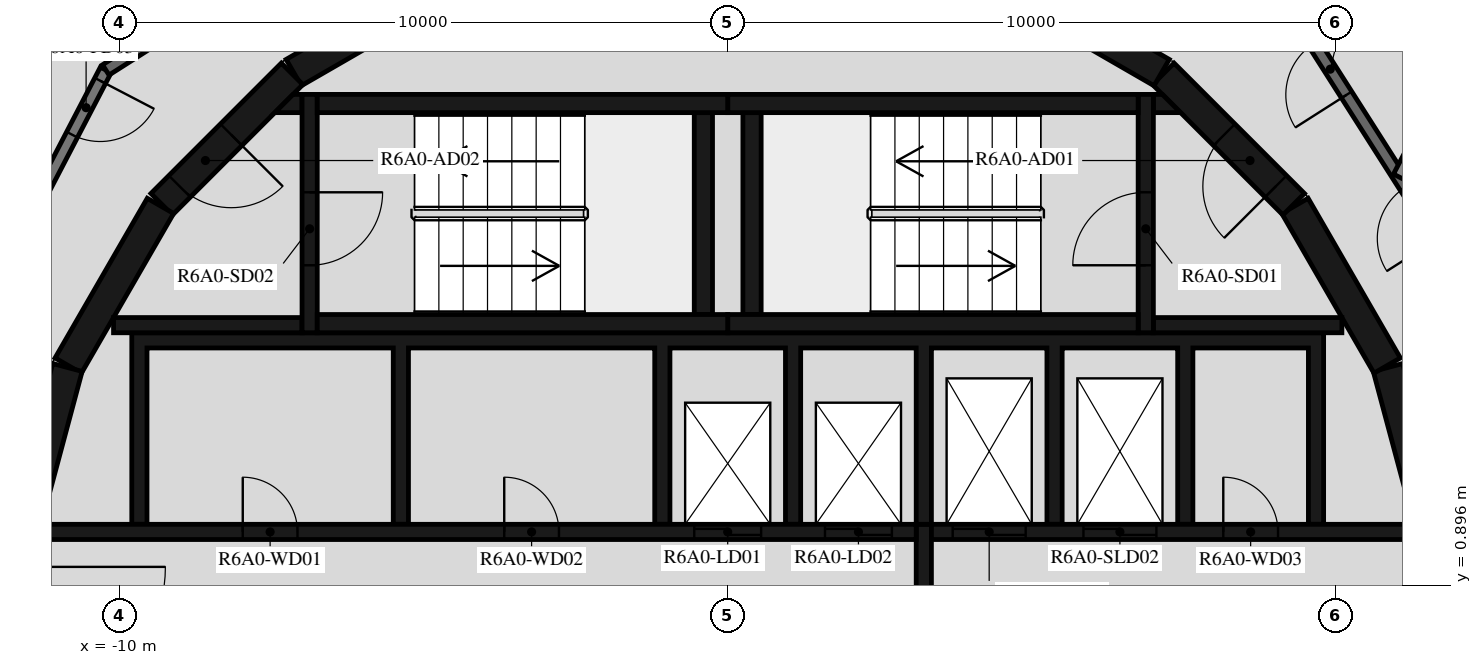
"""IFC4 building model, lengths in metres.
Left out: names, types, materials, properties, quantities, classifications, styles, units other than length and angle.
Written with IfcOpenShell. Run it as: python <this file> out.ifc"""

import sys

from ifc_helpers import new_model, si_unit, direction, frame, frame_2d, origin, place, context, subcontext, project, spatial, polyline, rectangle, outline, extrude, element, fill, save


model = new_model("IFC4")
c1 = context("Model", 3, precision=1e-05, world=origin(), true_north=direction((0.0, 1.0)))
c2 = subcontext(c1, "Body", "Model", "MODEL_VIEW")
j1 = project(units=[si_unit("LENGTHUNIT", "METRE"), si_unit("PLANEANGLEUNIT", "RADIAN")], contexts=[c1])
p1 = place(None, origin())
s1 = spatial("IfcSite", under=j1, at=p1, CompositionType="ELEMENT")
p2 = place(p1, origin())
s2 = spatial("IfcBuilding", under=s1, at=p2, CompositionType="ELEMENT")
p3 = place(p2, frame((0.0, 0.0, 226.7)))
s3 = spatial("IfcBuildingStorey", under=s2, at=p3, CompositionType="ELEMENT", Elevation=226.7)
for number, where, z_axis, x_axis in (
    (1, (11.643, 1.55, 0.0), (0.0, 0.0, 1.0), (-0.259, 0.966, 0.0)),
    (2, (10.845, 4.51, 0.0), (0.0, 0.0, 1.0), (-0.5, 0.866, 0.0)),
):
    element("IfcWall", number, at=place(p3, frame(where, z_axis=z_axis, x_axis=x_axis)), inside=s3, PredefinedType="SHEAR", context=c2, shape_type="SweptSolid", body=[
        extrude(rectangle(XDim=3.033, YDim=0.5, at=frame_2d((1.516, 0.0))), origin(), (0.0, 0.0, 1.0), 3.12),
    ])
p4 = place(p3, frame((9.308, 7.164, 0.0), z_axis=(0.0, 0.0, 1.0), x_axis=(-0.707106781187, 0.707106781187, 0.0)))
e3 = element("IfcWall", 3, at=p4, inside=s3, PredefinedType="SHEAR", context=c2, shape_type="SweptSolid", body=[
    extrude(rectangle(XDim=3.032, YDim=0.5, at=frame_2d((1.516, 0.0))), origin(), (0.0, 0.0, 1.0), 3.12),
])
p5 = place(p4, frame((0.416, 0.0, 0.0)))
e4 = element("IfcOpeningElement", 4, at=p5, cuts=e3, PredefinedType="OPENING", context=c2, shape_type="SweptSolid", body=[
    extrude(rectangle(XDim=1.2, YDim=2.1, at=frame_2d((0.6, 1.05))), frame((0.0, 0.26, 0.0), z_axis=(0.0, -1.0, 0.0), x_axis=(1.0, 0.0, 0.0)), (0.0, 0.0, 1.0), 0.52),
])
for number, where, z_axis, x_axis in (
    (5, (7.137, 9.329, 0.0), (0.0, 0.0, 1.0), (-0.866, 0.5, 0.0)),
    (6, (-4.51, 10.845, 0.0), (0.0, 0.0, 1.0), (-0.866, -0.5, 0.0)),
):
    element("IfcWall", number, at=place(p3, frame(where, z_axis=z_axis, x_axis=x_axis)), inside=s3, PredefinedType="SHEAR", context=c2, shape_type="SweptSolid", body=[
        extrude(rectangle(XDim=3.033, YDim=0.5, at=frame_2d((1.516, 0.0))), origin(), (0.0, 0.0, 1.0), 3.12),
    ])
p6 = place(p3, frame((-7.164, 9.308, 0.0), z_axis=(0.0, 0.0, 1.0), x_axis=(-0.707106781187, -0.707106781187, 0.0)))
e7 = element("IfcWall", 7, at=p6, inside=s3, PredefinedType="SHEAR", context=c2, shape_type="SweptSolid", body=[
    extrude(rectangle(XDim=3.032, YDim=0.5, at=frame_2d((1.516, 0.0))), origin(), (0.0, 0.0, 1.0), 3.12),
])
p7 = place(p6, frame((1.416, 0.0, 0.0)))
e8 = element("IfcOpeningElement", 8, at=p7, cuts=e7, PredefinedType="OPENING", context=c2, shape_type="SweptSolid", body=[
    extrude(rectangle(XDim=1.2, YDim=2.1, at=frame_2d((0.6, 1.05))), frame((0.0, 0.26, 0.0), z_axis=(0.0, -1.0, 0.0), x_axis=(1.0, 0.0, 0.0)), (0.0, 0.0, 1.0), 0.52),
])
for number, where, z_axis, x_axis in (
    (9, (-9.329, 7.137, 0.0), (0.0, 0.0, 1.0), (-0.5, -0.866, 0.0)),
    (10, (-10.858, 4.479, 0.0), (0.0, 0.0, 1.0), (-0.259, -0.966, 0.0)),
):
    element("IfcWall", number, at=place(p3, frame(where, z_axis=z_axis, x_axis=x_axis)), inside=s3, PredefinedType="SHEAR", context=c2, shape_type="SweptSolid", body=[
        extrude(rectangle(XDim=3.033, YDim=0.5, at=frame_2d((1.516, 0.0))), origin(), (0.0, 0.0, 1.0), 3.12),
    ])
for number, where, z_axis, x_axis in (
    (11, (0.0, 5.2, 0.0), (0.0, 0.0, 1.0), (1.0, 0.0, 0.0)),
    (12, (0.0, 8.82, 0.0), (0.0, 0.0, 1.0), (1.0, 0.0, 0.0)),
):
    element("IfcWall", number, at=place(p3, frame(where, z_axis=z_axis, x_axis=x_axis)), inside=s3, PredefinedType="SHEAR", context=c2, shape_type="SweptSolid", body=[
        extrude(rectangle(XDim=6.75, YDim=0.3, at=frame_2d((3.375, 0.0))), origin(), (0.0, 0.0, 1.0), 3.12),
    ])
p8 = place(p3, frame((0.4, 5.35, 0.0), z_axis=(0.0, 0.0, 1.0), x_axis=(0.0, 1.0, 0.0)))
e13 = element("IfcWall", 13, at=p8, inside=s3, PredefinedType="SHEAR", context=c2, shape_type="SweptSolid", body=[
    extrude(rectangle(XDim=3.32, YDim=0.3, at=frame_2d((1.66, 0.0))), origin(), (0.0, 0.0, 1.0), 3.12),
])
p9 = place(p3, frame((6.875, 5.05, 0.0), z_axis=(0.0, 0.0, 1.0), x_axis=(0.0, 1.0, 0.0)))
e14 = element("IfcWall", 14, at=p9, inside=s3, PredefinedType="SHEAR", context=c2, shape_type="SweptSolid", body=[
    extrude(rectangle(XDim=3.92, YDim=0.25, at=frame_2d((1.96, 0.0))), origin(), (0.0, 0.0, 1.0), 3.12),
])
p10 = place(p9, frame((1.11, 0.0, 0.0)))
e15 = element("IfcOpeningElement", 15, at=p10, cuts=e14, PredefinedType="OPENING", context=c2, shape_type="SweptSolid", body=[
    extrude(rectangle(XDim=1.2, YDim=2.1, at=frame_2d((0.6, 1.05))), frame((0.0, 0.135, 0.0), z_axis=(0.0, -1.0, 0.0), x_axis=(1.0, 0.0, 0.0)), (0.0, 0.0, 1.0), 0.27),
])
p11 = place(p3, frame((7.0, 5.175, 0.0), z_axis=(0.0, 0.0, 1.0), x_axis=(1.0, 0.0, 0.0)))
e16 = element("IfcWall", 16, at=p11, inside=s3, PredefinedType="SHEAR", context=c2, shape_type="SweptSolid", body=[
    extrude(rectangle(XDim=3.1, YDim=0.25, at=frame_2d((1.55, 0.0))), origin(), (0.0, 0.0, 1.0), 3.12),
])
p12 = place(p3, origin())
e17 = element("IfcWall", 17, at=p12, inside=s3, PredefinedType="SHEAR", context=c2, shape_type="SweptSolid", body=[
    extrude(outline(polyline([(7.448, 8.67), (7.0, 8.67), (7.0, 8.97), (7.148, 8.97), (7.448, 8.67)])), origin(), (0.0, 0.0, 1.0), 3.12),
])
for number, where, z_axis, x_axis in (
    (18, (-6.75, 5.2, 0.0), (0.0, 0.0, 1.0), (1.0, 0.0, 0.0)),
    (19, (-6.75, 8.82, 0.0), (0.0, 0.0, 1.0), (1.0, 0.0, 0.0)),
):
    element("IfcWall", number, at=place(p3, frame(where, z_axis=z_axis, x_axis=x_axis)), inside=s3, PredefinedType="SHEAR", context=c2, shape_type="SweptSolid", body=[
        extrude(rectangle(XDim=6.75, YDim=0.3, at=frame_2d((3.375, 0.0))), origin(), (0.0, 0.0, 1.0), 3.12),
    ])
p13 = place(p3, frame((-0.4, 5.35, 0.0), z_axis=(0.0, 0.0, 1.0), x_axis=(0.0, 1.0, 0.0)))
e20 = element("IfcWall", 20, at=p13, inside=s3, PredefinedType="SHEAR", context=c2, shape_type="SweptSolid", body=[
    extrude(rectangle(XDim=3.32, YDim=0.3, at=frame_2d((1.66, 0.0))), origin(), (0.0, 0.0, 1.0), 3.12),
])
p14 = place(p3, frame((-6.875, 8.97, 0.0), z_axis=(0.0, 0.0, 1.0), x_axis=(0.0, -1.0, 0.0)))
e21 = element("IfcWall", 21, at=p14, inside=s3, PredefinedType="SHEAR", context=c2, shape_type="SweptSolid", body=[
    extrude(rectangle(XDim=3.92, YDim=0.25, at=frame_2d((1.96, 0.0))), origin(), (0.0, 0.0, 1.0), 3.12),
])
p15 = place(p14, frame((1.61, 0.0, 0.0)))
e22 = element("IfcOpeningElement", 22, at=p15, cuts=e21, PredefinedType="OPENING", context=c2, shape_type="SweptSolid", body=[
    extrude(rectangle(XDim=1.2, YDim=2.1, at=frame_2d((0.6, 1.05))), frame((0.0, 0.135, 0.0), z_axis=(0.0, -1.0, 0.0), x_axis=(1.0, 0.0, 0.0)), (0.0, 0.0, 1.0), 0.27),
])
p16 = place(p3, frame((-7.0, 5.175, 0.0), z_axis=(0.0, 0.0, 1.0), x_axis=(-1.0, 0.0, 0.0)))
e23 = element("IfcWall", 23, at=p16, inside=s3, PredefinedType="SHEAR", context=c2, shape_type="SweptSolid", body=[
    extrude(rectangle(XDim=3.1, YDim=0.25, at=frame_2d((1.55, 0.0))), origin(), (0.0, 0.0, 1.0), 3.12),
])
p17 = place(p3, origin())
e24 = element("IfcWall", 24, at=p17, inside=s3, PredefinedType="SHEAR", context=c2, shape_type="SweptSolid", body=[
    extrude(outline(polyline([(-7.148, 8.97), (-7.0, 8.97), (-7.0, 8.67), (-7.448, 8.67), (-7.148, 8.97)])), origin(), (0.0, 0.0, 1.0), 3.12),
])
p18 = place(p3, origin())
e25 = element("IfcWall", 25, at=p18, inside=s3, PredefinedType="SHEAR", context=c2, shape_type="SweptSolid", body=[
    extrude(outline(polyline([(-9.55, 4.8), (-5.5, 4.8), (-5.5, 1.9), (-5.25, 1.9), (-5.25, 4.8), (-1.2, 4.8), (-1.2, 1.9), (-0.95, 1.9), (-0.95, 4.8), (0.95, 4.8), (0.95, 1.9), (1.2, 1.9), (1.2, 4.8), (3.1, 4.8), (3.1, 1.9), (3.35, 1.9), (3.35, 4.8), (5.25, 4.8), (5.25, 1.9), (5.5, 1.9), (5.5, 4.8), (7.4, 4.8), (7.4, 1.9), (7.65, 1.9), (7.65, 4.8), (9.55, 4.8), (9.55, 1.9), (9.8, 1.9), (9.8, 4.8), (9.8, 5.05), (-9.8, 5.05), (-9.8, 4.8), (-9.8, 1.9), (-9.55, 1.9), (-9.55, 4.8)])), origin(), (0.0, 0.0, 1.0), 3.12),
])
p19 = place(p3, frame((-11.28, 1.775, 0.0), z_axis=(0.0, 0.0, 1.0), x_axis=(1.0, 0.0, 0.0)))
e26 = element("IfcWall", 26, at=p19, inside=s3, PredefinedType="SHEAR", context=c2, shape_type="SweptSolid", body=[
    extrude(rectangle(XDim=14.38, YDim=0.25, at=frame_2d((7.19, 0.0))), origin(), (0.0, 0.0, 1.0), 3.12),
])
p20 = place(p19, frame((10.73, 0.0, 0.0)))
e27 = element("IfcOpeningElement", 27, at=p20, cuts=e26, PredefinedType="OPENING", context=c2, shape_type="SweptSolid", body=[
    extrude(rectangle(XDim=1.1, YDim=2.1, at=frame_2d((0.55, 1.05))), frame((0.0, 0.135, 0.0), z_axis=(0.0, -1.0, 0.0), x_axis=(1.0, 0.0, 0.0)), (0.0, 0.0, 1.0), 0.27),
])
p21 = place(p19, frame((12.88, 0.0, 0.0)))
e28 = element("IfcOpeningElement", 28, at=p21, cuts=e26, PredefinedType="OPENING", context=c2, shape_type="SweptSolid", body=[
    extrude(rectangle(XDim=1.1, YDim=2.1, at=frame_2d((0.55, 1.05))), frame((0.0, 0.135, 0.0), z_axis=(0.0, -1.0, 0.0), x_axis=(1.0, 0.0, 0.0)), (0.0, 0.0, 1.0), 0.27),
])
p22 = place(p19, frame((3.305, 0.0, 0.0)))
e29 = element("IfcOpeningElement", 29, at=p22, cuts=e26, PredefinedType="OPENING", context=c2, shape_type="SweptSolid", body=[
    extrude(rectangle(XDim=0.9, YDim=2.1, at=frame_2d((0.45, 1.05))), frame((0.0, 0.135, 0.0), z_axis=(0.0, -1.0, 0.0), x_axis=(1.0, 0.0, 0.0)), (0.0, 0.0, 1.0), 0.27),
])
p23 = place(p19, frame((7.605, 0.0, 0.0)))
e30 = element("IfcOpeningElement", 30, at=p23, cuts=e26, PredefinedType="OPENING", context=c2, shape_type="SweptSolid", body=[
    extrude(rectangle(XDim=0.9, YDim=2.1, at=frame_2d((0.45, 1.05))), frame((0.0, 0.135, 0.0), z_axis=(0.0, -1.0, 0.0), x_axis=(1.0, 0.0, 0.0)), (0.0, 0.0, 1.0), 0.27),
])
p24 = place(p3, frame((3.35, 1.775, 0.0), z_axis=(0.0, 0.0, 1.0), x_axis=(1.0, 0.0, 0.0)))
e31 = element("IfcWall", 31, at=p24, inside=s3, PredefinedType="SHEAR", context=c2, shape_type="SweptSolid", body=[
    extrude(rectangle(XDim=7.93, YDim=0.25, at=frame_2d((3.965, 0.0))), origin(), (0.0, 0.0, 1.0), 3.12),
])
p25 = place(p24, frame((0.35, 0.0, 0.0)))
e32 = element("IfcOpeningElement", 32, at=p25, cuts=e31, PredefinedType="OPENING", context=c2, shape_type="SweptSolid", body=[
    extrude(rectangle(XDim=1.2, YDim=2.4, at=frame_2d((0.6, 1.2))), frame((0.0, 0.135, 0.0), z_axis=(0.0, -1.0, 0.0), x_axis=(1.0, 0.0, 0.0)), (0.0, 0.0, 1.0), 0.27),
])
p26 = place(p24, frame((2.5, 0.0, 0.0)))
e33 = element("IfcOpeningElement", 33, at=p26, cuts=e31, PredefinedType="OPENING", context=c2, shape_type="SweptSolid", body=[
    extrude(rectangle(XDim=1.2, YDim=2.4, at=frame_2d((0.6, 1.2))), frame((0.0, 0.135, 0.0), z_axis=(0.0, -1.0, 0.0), x_axis=(1.0, 0.0, 0.0)), (0.0, 0.0, 1.0), 0.27),
])
p27 = place(p24, frame((4.8, 0.0, 0.0)))
e34 = element("IfcOpeningElement", 34, at=p27, cuts=e31, PredefinedType="OPENING", context=c2, shape_type="SweptSolid", body=[
    extrude(rectangle(XDim=0.9, YDim=2.1, at=frame_2d((0.45, 1.05))), frame((0.0, 0.135, 0.0), z_axis=(0.0, -1.0, 0.0), x_axis=(1.0, 0.0, 0.0)), (0.0, 0.0, 1.0), 0.27),
])
p28 = place(p3, frame((3.225, -1.9, 0.0), z_axis=(0.0, 0.0, 1.0), x_axis=(0.0, 1.0, 0.0)))
e35 = element("IfcWall", 35, at=p28, inside=s3, PredefinedType="SHEAR", context=c2, shape_type="SweptSolid", body=[
    extrude(rectangle(XDim=3.8, YDim=0.25, at=frame_2d((1.9, 0.0))), origin(), (0.0, 0.0, 1.0), 3.12),
])
p29 = place(p3, frame((13.231, 4.172, 0.0), z_axis=(0.0, 0.0, 1.0), x_axis=(-0.537304397561, 0.843388394728, 0.0)))
e36 = element("IfcWall", 36, at=p29, inside=s3, PredefinedType="STANDARD", context=c2, shape_type="SweptSolid", body=[
    extrude(rectangle(XDim=7.181, YDim=0.2, at=frame_2d((3.59, 0.0))), origin(), (0.0, 0.0, 1.0), 3.12),
])
p30 = place(p29, frame((2.881, 0.0, 0.0)))
e37 = element("IfcOpeningElement", 37, at=p30, cuts=e36, PredefinedType="OPENING", context=c2, shape_type="SweptSolid", body=[
    extrude(rectangle(XDim=1.0, YDim=2.1, at=frame_2d((0.5, 1.05))), frame((0.0, 0.11, 0.0), z_axis=(0.0, -1.0, 0.0), x_axis=(1.0, 0.0, 0.0)), (0.0, 0.0, 1.0), 0.22),
])
p31 = place(p29, frame((5.681, 0.0, 0.0)))
e38 = element("IfcOpeningElement", 38, at=p31, cuts=e36, PredefinedType="OPENING", context=c2, shape_type="SweptSolid", body=[
    extrude(rectangle(XDim=1.0, YDim=2.1, at=frame_2d((0.5, 1.05))), frame((0.0, 0.11, 0.0), z_axis=(0.0, -1.0, 0.0), x_axis=(1.0, 0.0, 0.0)), (0.0, 0.0, 1.0), 0.22),
])
p32 = place(p3, frame((-10.228, 9.372, 0.0), z_axis=(0.0, 0.0, 1.0), x_axis=(-0.461759464021, -0.887005184532, 0.0)))
e39 = element("IfcWall", 39, at=p32, inside=s3, PredefinedType="STANDARD", context=c2, shape_type="SweptSolid", body=[
    extrude(rectangle(XDim=7.181, YDim=0.2, at=frame_2d((3.591, 0.0))), origin(), (0.0, 0.0, 1.0), 3.12),
])
p33 = place(p32, frame((0.2, 0.0, 0.0)))
e40 = element("IfcOpeningElement", 40, at=p33, cuts=e39, PredefinedType="OPENING", context=c2, shape_type="SweptSolid", body=[
    extrude(rectangle(XDim=1.0, YDim=2.1, at=frame_2d((0.5, 1.05))), frame((0.0, 0.11, 0.0), z_axis=(0.0, -1.0, 0.0), x_axis=(1.0, 0.0, 0.0)), (0.0, 0.0, 1.0), 0.22),
])
p34 = place(p3, frame((-4.172, 13.231, 0.0), z_axis=(0.0, 0.0, 1.0), x_axis=(-0.843388394728, -0.537304397561, 0.0)))
e41 = element("IfcWall", 41, at=p34, inside=s3, PredefinedType="STANDARD", context=c2, shape_type="SweptSolid", body=[
    extrude(rectangle(XDim=7.181, YDim=0.2, at=frame_2d((3.59, 0.0))), origin(), (0.0, 0.0, 1.0), 3.12),
])
p35 = place(p3, frame((13.801, 12.922, 0.0), z_axis=(0.0, 0.0, 1.0), x_axis=(-0.461726485624, -0.887022351733, 0.0)))
e42 = element("IfcWall", 42, at=p35, inside=s3, PredefinedType="STANDARD", context=c2, shape_type="SweptSolid", body=[
    extrude(rectangle(XDim=5.984, YDim=0.2, at=frame_2d((2.992, 0.0))), origin(), (0.0, 0.0, 1.0), 2.73),
])
p36 = place(p10, origin())
e43 = element("IfcDoor", 43, at=p36, inside=s3, OperationType="SINGLE_SWING_LEFT", PredefinedType="DOOR", context=c2, shape_type="SweptSolid", body=[
    extrude(rectangle(XDim=1.2, YDim=2.1, at=frame_2d((0.6, 1.05))), frame((0.0, 0.025, 0.0), z_axis=(0.0, -1.0, 0.0), x_axis=(1.0, 0.0, 0.0)), (0.0, 0.0, 1.0), 0.05),
])
fill(e15, e43)
p37 = place(p5, origin())
e44 = element("IfcDoor", 44, at=p37, inside=s3, OperationType="SINGLE_SWING_RIGHT", PredefinedType="DOOR", context=c2, shape_type="SweptSolid", body=[
    extrude(rectangle(XDim=1.2, YDim=2.1, at=frame_2d((0.6, 1.05))), frame((0.0, 0.025, 0.0), z_axis=(0.0, -1.0, 0.0), x_axis=(1.0, 0.0, 0.0)), (0.0, 0.0, 1.0), 0.05),
])
fill(e4, e44)
p38 = place(p15, origin())
e45 = element("IfcDoor", 45, at=p38, inside=s3, OperationType="SINGLE_SWING_LEFT", PredefinedType="DOOR", context=c2, shape_type="SweptSolid", body=[
    extrude(rectangle(XDim=1.2, YDim=2.1, at=frame_2d((0.6, 1.05))), frame((0.0, 0.025, 0.0), z_axis=(0.0, -1.0, 0.0), x_axis=(1.0, 0.0, 0.0)), (0.0, 0.0, 1.0), 0.05),
])
fill(e22, e45)
p39 = place(p7, origin())
e46 = element("IfcDoor", 46, at=p39, inside=s3, OperationType="SINGLE_SWING_RIGHT", PredefinedType="DOOR", context=c2, shape_type="SweptSolid", body=[
    extrude(rectangle(XDim=1.2, YDim=2.1, at=frame_2d((0.6, 1.05))), frame((0.0, 0.025, 0.0), z_axis=(0.0, -1.0, 0.0), x_axis=(1.0, 0.0, 0.0)), (0.0, 0.0, 1.0), 0.05),
])
fill(e8, e46)
p40 = place(p20, origin())
e47 = element("IfcDoor", 47, at=p40, inside=s3, OperationType="DOUBLE_DOOR_SLIDING", PredefinedType="DOOR", context=c2, shape_type="SweptSolid", body=[
    extrude(rectangle(XDim=1.1, YDim=2.1, at=frame_2d((0.55, 1.05))), frame((0.0, 0.025, 0.0), z_axis=(0.0, -1.0, 0.0), x_axis=(1.0, 0.0, 0.0)), (0.0, 0.0, 1.0), 0.05),
])
fill(e27, e47)
p41 = place(p21, origin())
e48 = element("IfcDoor", 48, at=p41, inside=s3, OperationType="DOUBLE_DOOR_SLIDING", PredefinedType="DOOR", context=c2, shape_type="SweptSolid", body=[
    extrude(rectangle(XDim=1.1, YDim=2.1, at=frame_2d((0.55, 1.05))), frame((0.0, 0.025, 0.0), z_axis=(0.0, -1.0, 0.0), x_axis=(1.0, 0.0, 0.0)), (0.0, 0.0, 1.0), 0.05),
])
fill(e28, e48)
p42 = place(p25, origin())
e49 = element("IfcDoor", 49, at=p42, inside=s3, OperationType="DOUBLE_DOOR_SLIDING", PredefinedType="DOOR", context=c2, shape_type="SweptSolid", body=[
    extrude(rectangle(XDim=1.2, YDim=2.4, at=frame_2d((0.6, 1.2))), frame((0.0, 0.025, 0.0), z_axis=(0.0, -1.0, 0.0), x_axis=(1.0, 0.0, 0.0)), (0.0, 0.0, 1.0), 0.05),
])
fill(e32, e49)
p43 = place(p26, origin())
e50 = element("IfcDoor", 50, at=p43, inside=s3, OperationType="DOUBLE_DOOR_SLIDING", PredefinedType="DOOR", context=c2, shape_type="SweptSolid", body=[
    extrude(rectangle(XDim=1.2, YDim=2.4, at=frame_2d((0.6, 1.2))), frame((0.0, 0.025, 0.0), z_axis=(0.0, -1.0, 0.0), x_axis=(1.0, 0.0, 0.0)), (0.0, 0.0, 1.0), 0.05),
])
fill(e33, e50)
p44 = place(p22, origin())
e51 = element("IfcDoor", 51, at=p44, inside=s3, OperationType="SINGLE_SWING_LEFT", PredefinedType="DOOR", context=c2, shape_type="SweptSolid", body=[
    extrude(rectangle(XDim=0.9, YDim=2.1, at=frame_2d((0.45, 1.05))), frame((0.0, 0.025, 0.0), z_axis=(0.0, -1.0, 0.0), x_axis=(1.0, 0.0, 0.0)), (0.0, 0.0, 1.0), 0.05),
])
fill(e29, e51)
p45 = place(p23, origin())
e52 = element("IfcDoor", 52, at=p45, inside=s3, OperationType="SINGLE_SWING_RIGHT", PredefinedType="DOOR", context=c2, shape_type="SweptSolid", body=[
    extrude(rectangle(XDim=0.9, YDim=2.1, at=frame_2d((0.45, 1.05))), frame((0.0, 0.025, 0.0), z_axis=(0.0, -1.0, 0.0), x_axis=(1.0, 0.0, 0.0)), (0.0, 0.0, 1.0), 0.05),
])
fill(e30, e52)
p46 = place(p27, origin())
e53 = element("IfcDoor", 53, at=p46, inside=s3, OperationType="SINGLE_SWING_LEFT", PredefinedType="DOOR", context=c2, shape_type="SweptSolid", body=[
    extrude(rectangle(XDim=0.9, YDim=2.1, at=frame_2d((0.45, 1.05))), frame((0.0, 0.025, 0.0), z_axis=(0.0, -1.0, 0.0), x_axis=(1.0, 0.0, 0.0)), (0.0, 0.0, 1.0), 0.05),
])
fill(e34, e53)
p47 = place(p31, origin())
e54 = element("IfcDoor", 54, at=p47, inside=s3, OperationType="SINGLE_SWING_LEFT", PredefinedType="DOOR", context=c2, shape_type="SweptSolid", body=[
    extrude(rectangle(XDim=1.0, YDim=2.1, at=frame_2d((0.5, 1.05))), frame((0.0, 0.025, 0.0), z_axis=(0.0, -1.0, 0.0), x_axis=(1.0, 0.0, 0.0)), (0.0, 0.0, 1.0), 0.05),
])
fill(e38, e54)
p48 = place(p33, origin())
e55 = element("IfcDoor", 55, at=p48, inside=s3, OperationType="SINGLE_SWING_LEFT", PredefinedType="DOOR", context=c2, shape_type="SweptSolid", body=[
    extrude(rectangle(XDim=1.0, YDim=2.1, at=frame_2d((0.5, 1.05))), frame((0.0, 0.025, 0.0), z_axis=(0.0, -1.0, 0.0), x_axis=(1.0, 0.0, 0.0)), (0.0, 0.0, 1.0), 0.05),
])
fill(e40, e55)
save(model, sys.argv[1])
